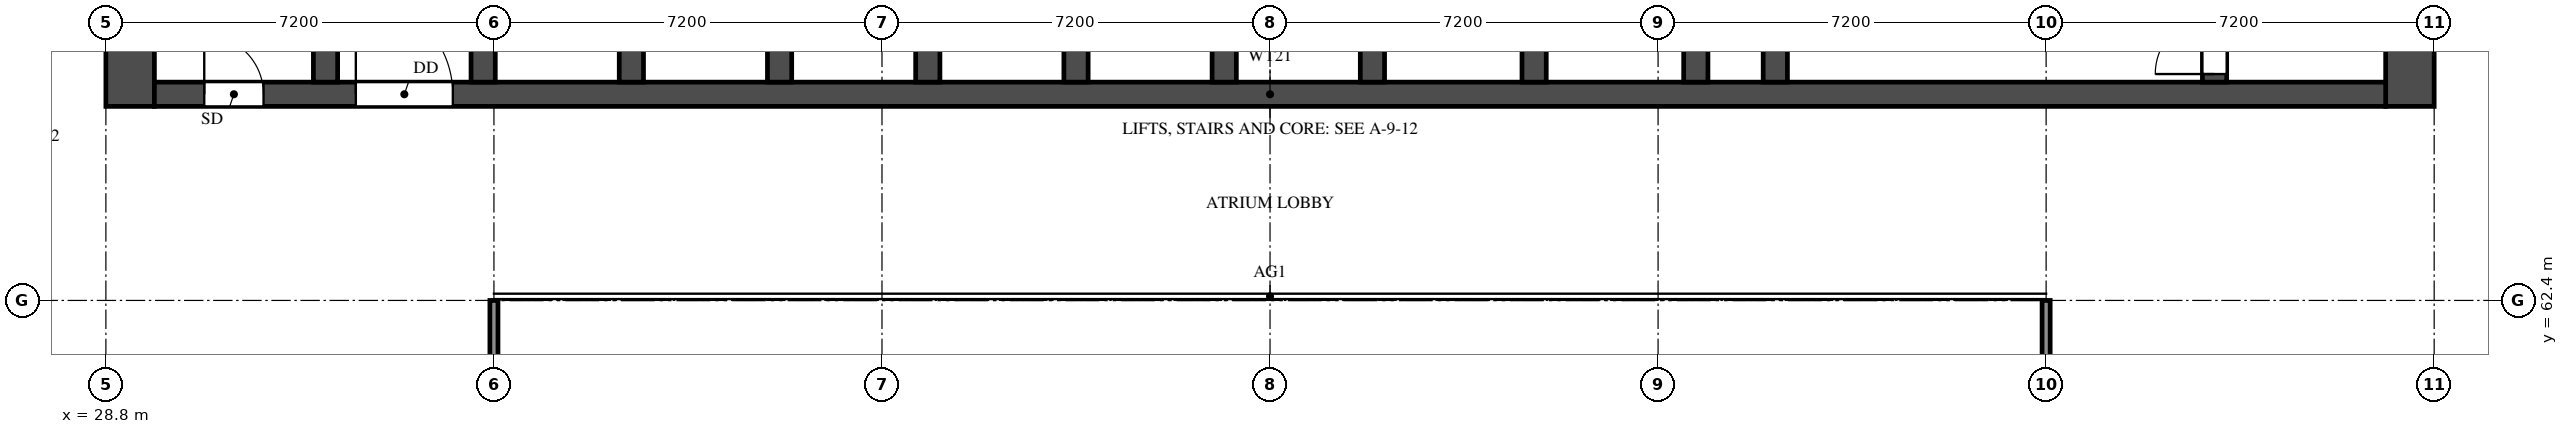
"""IFC4 building model, lengths in metres.
Left out: names, types, materials, properties, quantities, classifications, styles, units other than length and angle.
Written with IfcOpenShell. Run it as: python <this file> out.ifc"""

import sys

from ifc_helpers import new_model, si_unit, direction, frame, frame_2d, origin, place, context, subcontext, project, spatial, rectangle, extrude, element, fill, save


model = new_model("IFC4")
c1 = context("Model", 3, precision=1e-05, world=origin(), true_north=direction((0.0, 1.0)))
c2 = subcontext(c1, "Body", "Model", "MODEL_VIEW")
j1 = project(units=[si_unit("LENGTHUNIT", "METRE"), si_unit("PLANEANGLEUNIT", "RADIAN")], contexts=[c1])
p1 = place(None, origin())
s1 = spatial("IfcSite", under=j1, at=p1, CompositionType="ELEMENT")
p2 = place(p1, origin())
s2 = spatial("IfcBuilding", under=s1, at=p2, CompositionType="ELEMENT")
p3 = place(p2, frame((0.0, 0.0, 72.5)))
s3 = spatial("IfcBuildingStorey", under=s2, at=p3, CompositionType="ELEMENT", Elevation=72.5)
for number, where, z_axis, x_axis in (
    (1, (29.25, 66.0, 0.0), (0.0, 0.0, 1.0), (0.0, 1.0, 0.0)),
    (2, (71.55, 66.0, 0.0), (0.0, 0.0, 1.0), (0.0, 1.0, 0.0)),
):
    element("IfcWall", number, at=place(p3, frame(where, z_axis=z_axis, x_axis=x_axis)), inside=s3, PredefinedType="SHEAR", context=c2, shape_type="SweptSolid", body=[
        extrude(rectangle(XDim=12.0, YDim=0.9, at=frame_2d((6.0, 0.0))), origin(), (0.0, 0.0, 1.0), 3.18),
    ])
p4 = place(p3, frame((29.7, 66.225, 0.0), z_axis=(0.0, 0.0, 1.0), x_axis=(1.0, 0.0, 0.0)))
e3 = element("IfcWall", 3, at=p4, inside=s3, PredefinedType="SHEAR", context=c2, shape_type="SweptSolid", body=[
    extrude(rectangle(XDim=41.4, YDim=0.45, at=frame_2d((20.7, 0.0))), origin(), (0.0, 0.0, 1.0), 3.18),
])
p5 = place(p4, frame((0.925, 0.0, 0.0)))
e4 = element("IfcOpeningElement", 4, at=p5, cuts=e3, PredefinedType="OPENING", context=c2, shape_type="SweptSolid", body=[
    extrude(rectangle(XDim=1.1, YDim=2.1, at=frame_2d((0.55, 1.05))), frame((0.0, 0.235, 0.0), z_axis=(0.0, -1.0, 0.0), x_axis=(1.0, 0.0, 0.0)), (0.0, 0.0, 1.0), 0.47),
])
p6 = place(p4, frame((3.738, 0.0, 0.0)))
e5 = element("IfcOpeningElement", 5, at=p6, cuts=e3, PredefinedType="OPENING", context=c2, shape_type="SweptSolid", body=[
    extrude(rectangle(XDim=1.8, YDim=2.1, at=frame_2d((0.9, 1.05))), frame((0.0, 0.235, 0.0), z_axis=(0.0, -1.0, 0.0), x_axis=(1.0, 0.0, 0.0)), (0.0, 0.0, 1.0), 0.47),
])
p7 = place(p3, frame((32.875, 66.45, 0.0), z_axis=(0.0, 0.0, 1.0), x_axis=(0.0, 1.0, 0.0)))
e6 = element("IfcWall", 6, at=p7, inside=s3, PredefinedType="SHEAR", context=c2, shape_type="SweptSolid", body=[
    extrude(rectangle(XDim=10.65, YDim=0.45, at=frame_2d((5.325, 0.0))), origin(), (0.0, 0.0, 1.0), 3.18),
])
p8 = place(p3, frame((67.925, 66.45, 0.0), z_axis=(0.0, 0.0, 1.0), x_axis=(0.0, 1.0, 0.0)))
e7 = element("IfcWall", 7, at=p8, inside=s3, PredefinedType="SHEAR", context=c2, shape_type="SweptSolid", body=[
    extrude(rectangle(XDim=10.65, YDim=0.45, at=frame_2d((5.325, 0.0))), origin(), (0.0, 0.0, 1.0), 3.18),
])
p9 = place(p8, frame((0.15, 0.0, 0.0)))
e8 = element("IfcOpeningElement", 8, at=p9, cuts=e7, PredefinedType="OPENING", context=c2, shape_type="SweptSolid", body=[
    extrude(rectangle(XDim=1.1, YDim=2.1, at=frame_2d((0.55, 1.05))), frame((0.0, 0.235, 0.0), z_axis=(0.0, -1.0, 0.0), x_axis=(1.0, 0.0, 0.0)), (0.0, 0.0, 1.0), 0.47),
])
p10 = place(p3, frame((59.775, 66.45, 0.0), z_axis=(0.0, 0.0, 1.0), x_axis=(0.0, 1.0, 0.0)))
e9 = element("IfcWall", 9, at=p10, inside=s3, PredefinedType="SHEAR", context=c2, shape_type="SweptSolid", body=[
    extrude(rectangle(XDim=6.025, YDim=0.45, at=frame_2d((3.013, 0.0))), origin(), (0.0, 0.0, 1.0), 3.18),
])
p11 = place(p10, frame((3.85, 0.0, 0.0)))
e10 = element("IfcOpeningElement", 10, at=p11, cuts=e9, PredefinedType="OPENING", context=c2, shape_type="SweptSolid", body=[
    extrude(rectangle(XDim=1.2, YDim=2.1, at=frame_2d((0.6, 1.05))), frame((0.0, 0.235, 0.0), z_axis=(0.0, -1.0, 0.0), x_axis=(1.0, 0.0, 0.0)), (0.0, 0.0, 1.0), 0.47),
])
for number, where, z_axis, x_axis in (
    (11, (35.8, 66.45, 0.0), (0.0, 0.0, 1.0), (0.0, 1.0, 0.0)),
    (12, (38.55, 66.45, 0.0), (0.0, 0.0, 1.0), (0.0, 1.0, 0.0)),
    (13, (41.3, 66.45, 0.0), (0.0, 0.0, 1.0), (0.0, 1.0, 0.0)),
    (14, (44.05, 66.45, 0.0), (0.0, 0.0, 1.0), (0.0, 1.0, 0.0)),
    (15, (46.8, 66.45, 0.0), (0.0, 0.0, 1.0), (0.0, 1.0, 0.0)),
    (16, (49.55, 66.45, 0.0), (0.0, 0.0, 1.0), (0.0, 1.0, 0.0)),
    (17, (52.3, 66.45, 0.0), (0.0, 0.0, 1.0), (0.0, 1.0, 0.0)),
    (18, (55.3, 66.45, 0.0), (0.0, 0.0, 1.0), (0.0, 1.0, 0.0)),
    (19, (58.3, 66.45, 0.0), (0.0, 0.0, 1.0), (0.0, 1.0, 0.0)),
):
    element("IfcWall", number, at=place(p3, frame(where, z_axis=z_axis, x_axis=x_axis)), inside=s3, PredefinedType="SHEAR", context=c2, shape_type="SweptSolid", body=[
        extrude(rectangle(XDim=2.425, YDim=0.45, at=frame_2d((1.212, 0.0))), origin(), (0.0, 0.0, 1.0), 3.18),
    ])
for number, where, z_axis, x_axis in (
    (20, (36.0, 48.0, 0.0), (0.0, 0.0, 1.0), (0.0, 1.0, 0.0)),
    (21, (64.8, 48.0, 0.0), (0.0, 0.0, 1.0), (0.0, 1.0, 0.0)),
):
    element("IfcWall", number, at=place(p3, frame(where, z_axis=z_axis, x_axis=x_axis)), inside=s3, PredefinedType="SOLIDWALL", context=c2, shape_type="SweptSolid", body=[
        extrude(rectangle(XDim=14.4, YDim=0.15, at=frame_2d((7.2, 0.0))), origin(), (0.0, 0.0, 1.0), 2.28),
    ])
p12 = place(p5, origin())
e22 = element("IfcDoor", 22, at=p12, inside=s3, OperationType="SINGLE_SWING_LEFT", PredefinedType="DOOR", context=c2, shape_type="SweptSolid", body=[
    extrude(rectangle(XDim=1.1, YDim=2.1, at=frame_2d((0.55, 1.05))), frame((0.0, 0.025, 0.0), z_axis=(0.0, -1.0, 0.0), x_axis=(1.0, 0.0, 0.0)), (0.0, 0.0, 1.0), 0.05),
])
fill(e4, e22)
p13 = place(p9, origin())
e23 = element("IfcDoor", 23, at=p13, inside=s3, OperationType="SINGLE_SWING_LEFT", PredefinedType="DOOR", context=c2, shape_type="SweptSolid", body=[
    extrude(rectangle(XDim=1.1, YDim=2.1, at=frame_2d((0.55, 1.05))), frame((0.0, 0.025, 0.0), z_axis=(0.0, -1.0, 0.0), x_axis=(1.0, 0.0, 0.0)), (0.0, 0.0, 1.0), 0.05),
])
fill(e8, e23)
p14 = place(p6, origin())
e24 = element("IfcDoor", 24, at=p14, inside=s3, OperationType="DOUBLE_DOOR_SINGLE_SWING", PredefinedType="DOOR", context=c2, shape_type="SweptSolid", body=[
    extrude(rectangle(XDim=1.8, YDim=2.1, at=frame_2d((0.9, 1.05))), frame((0.0, 0.025, 0.0), z_axis=(0.0, -1.0, 0.0), x_axis=(1.0, 0.0, 0.0)), (0.0, 0.0, 1.0), 0.05),
])
fill(e5, e24)
save(model, sys.argv[1])
